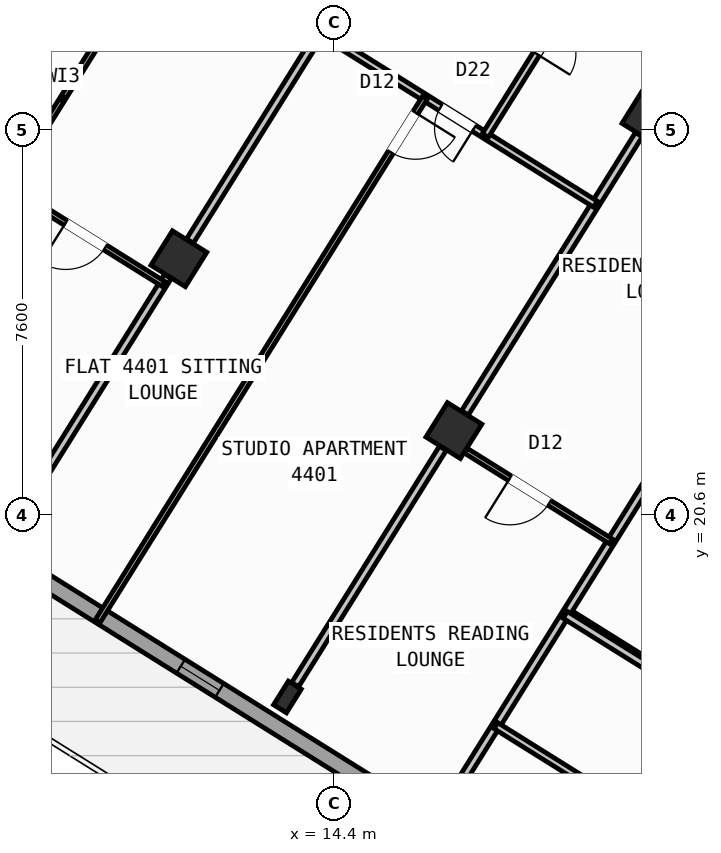
"""IFC4 building model, lengths in metres.
Left out: names, types, materials, properties, quantities, classifications, styles, units other than length and angle.
Written with IfcOpenShell. Run it as: python <this file> out.ifc"""

import sys

from ifc_helpers import new_model, si_unit, direction, frame, frame_2d, origin, origin_2d, place, context, subcontext, project, spatial, rectangle, hollow_rectangle, i_section, extrude, source, transform, mapped, element, fill, save


model = new_model("IFC4")
c1 = context("Model", 3, precision=1e-05, world=origin(), true_north=direction((0.0, 1.0)))
c2 = subcontext(c1, "Body", "Model", "MODEL_VIEW")
j1 = project(units=[si_unit("LENGTHUNIT", "METRE"), si_unit("PLANEANGLEUNIT", "RADIAN")], contexts=[c1])
p1 = place(None, origin())
s1 = spatial("IfcSite", under=j1, at=p1, CompositionType="ELEMENT")
p2 = place(p1, origin())
s2 = spatial("IfcBuilding", under=s1, at=p2, CompositionType="ELEMENT")
p3 = place(p2, frame((0.0, 0.0, 174.9)))
s3 = spatial("IfcBuildingStorey", under=s2, at=p3, CompositionType="ELEMENT", Elevation=174.9)
m1 = source(origin(), c2, "Body", "SweptSolid", [
    extrude(hollow_rectangle(XDim=0.8, YDim=0.8, WallThickness=0.032, at=origin_2d()), origin(), (0.0, 0.0, 1.0), 4.5),
])
for number, where, z_axis, x_axis in (
    (1, (20.632, 28.452, 0.0), (0.0, 0.0, 1.0), (-0.848, 0.53, 0.0)),
    (2, (16.764, 22.261, 0.0), (0.0, 0.0, 1.0), (-0.848, 0.53, 0.0)),
):
    element("IfcColumn", number, at=place(p3, frame(where, z_axis=z_axis, x_axis=x_axis)), inside=s3, PredefinedType="COLUMN", context=c2, shape_type="MappedRepresentation", body=[
        mapped(m1, transform((0.0, 0.0, 0.0), scale=1.0)),
    ])
m2 = source(origin(), c2, "Body", "SweptSolid", [
    extrude(i_section(OverallWidth=0.3, OverallDepth=0.55, WebThickness=0.015, FlangeThickness=0.029, at=origin_2d()), origin(), (0.0, 0.0, 1.0), 4.5),
])
p4 = place(p3, frame((13.478, 17.003, 0.0), z_axis=(0.0, 0.0, 1.0), x_axis=(-0.848048096156, 0.529919264233, 0.0)))
e3 = element("IfcColumn", 3, at=p4, inside=s3, PredefinedType="COLUMN", context=c2, shape_type="MappedRepresentation", body=[
    mapped(m2, transform((0.0, 0.0, 0.0), scale=1.0)),
])
p5 = place(p3, frame((11.336, 25.653, 0.0), z_axis=(0.0, 0.0, 1.0), x_axis=(-0.848048096156, 0.529919264233, 0.0)))
e4 = element("IfcColumn", 4, at=p5, inside=s3, PredefinedType="COLUMN", context=c2, shape_type="MappedRepresentation", body=[
    mapped(m1, transform((0.0, 0.0, 0.0), scale=1.0)),
])
p6 = place(p3, frame((29.268, 6.429, 0.0), z_axis=(0.0, 0.0, 1.0), x_axis=(-0.848049971435, 0.529916263149, 0.0)))
e5 = element("IfcWall", 5, at=p6, inside=s3, PredefinedType="STANDARD", context=c2, shape_type="SweptSolid", body=[
    extrude(rectangle(XDim=31.588, YDim=0.32, at=frame_2d((15.794, 0.0))), origin(), (0.0, 0.0, 1.0), 4.22),
])
p7 = place(p6, frame((27.641, 0.0, 0.0)))
e6 = element("IfcOpeningElement", 6, at=p7, cuts=e5, PredefinedType="OPENING", context=c2, shape_type="SweptSolid", body=[
    extrude(rectangle(XDim=1.2, YDim=2.15, at=frame_2d((0.6, 1.075))), frame((0.0, 0.17, 0.0), z_axis=(0.0, -1.0, 0.0), x_axis=(1.0, 0.0, 0.0)), (0.0, 0.0, 1.0), 0.34),
])
p8 = place(p6, frame((2.954, 0.0, 0.8)))
e7 = element("IfcOpeningElement", 7, at=p8, cuts=e5, PredefinedType="OPENING", context=c2, shape_type="SweptSolid", body=[
    extrude(rectangle(XDim=2.1, YDim=1.55, at=frame_2d((1.05, 0.775))), frame((0.0, 0.17, 0.0), z_axis=(0.0, -1.0, 0.0), x_axis=(1.0, 0.0, 0.0)), (0.0, 0.0, 1.0), 0.34),
])
p9 = place(p6, frame((8.253, 0.0, 0.8)))
e8 = element("IfcOpeningElement", 8, at=p9, cuts=e5, PredefinedType="OPENING", context=c2, shape_type="SweptSolid", body=[
    extrude(rectangle(XDim=2.1, YDim=1.55, at=frame_2d((1.05, 0.775))), frame((0.0, 0.17, 0.0), z_axis=(0.0, -1.0, 0.0), x_axis=(1.0, 0.0, 0.0)), (0.0, 0.0, 1.0), 0.34),
])
p10 = place(p6, frame((20.2, 0.0, 1.0)))
e9 = element("IfcOpeningElement", 9, at=p10, cuts=e5, PredefinedType="OPENING", context=c2, shape_type="SweptSolid", body=[
    extrude(rectangle(XDim=0.9, YDim=1.25, at=frame_2d((0.45, 0.625))), frame((0.0, 0.17, 0.0), z_axis=(0.0, -1.0, 0.0), x_axis=(1.0, 0.0, 0.0)), (0.0, 0.0, 1.0), 0.34),
])
p11 = place(p3, frame((2.415, 23.452, 0.0), z_axis=(0.0, 0.0, 1.0), x_axis=(0.52991049553, 0.848053575387, 0.0)))
e10 = element("IfcWall", 10, at=p11, inside=s3, PredefinedType="STANDARD", context=c2, shape_type="SweptSolid", body=[
    extrude(rectangle(XDim=21.587, YDim=0.32, at=frame_2d((10.794, 0.0))), origin(), (0.0, 0.0, 1.0), 2.395),
])
p12 = place(p11, frame((3.469, 0.0, 1.0)))
e11 = element("IfcOpeningElement", 11, at=p12, cuts=e10, PredefinedType="OPENING", context=c2, shape_type="SweptSolid", body=[
    extrude(rectangle(XDim=0.9, YDim=1.25, at=frame_2d((0.45, 0.625))), frame((0.0, 0.17, 0.0), z_axis=(0.0, -1.0, 0.0), x_axis=(1.0, 0.0, 0.0)), (0.0, 0.0, 1.0), 0.34),
])
p13 = place(p11, frame((8.344, 0.0, 1.0)))
e12 = element("IfcOpeningElement", 12, at=p13, cuts=e10, PredefinedType="OPENING", context=c2, shape_type="SweptSolid", body=[
    extrude(rectangle(XDim=0.9, YDim=1.25, at=frame_2d((0.45, 0.625))), frame((0.0, 0.17, 0.0), z_axis=(0.0, -1.0, 0.0), x_axis=(1.0, 0.0, 0.0)), (0.0, 0.0, 1.0), 0.34),
])
p14 = place(p11, frame((11.244, 0.0, 1.0)))
e13 = element("IfcOpeningElement", 13, at=p14, cuts=e10, PredefinedType="OPENING", context=c2, shape_type="SweptSolid", body=[
    extrude(rectangle(XDim=0.9, YDim=1.25, at=frame_2d((0.45, 0.625))), frame((0.0, 0.17, 0.0), z_axis=(0.0, -1.0, 0.0), x_axis=(1.0, 0.0, 0.0)), (0.0, 0.0, 1.0), 0.34),
])
p15 = place(p11, frame((14.829, 0.0, 1.0)))
e14 = element("IfcOpeningElement", 14, at=p15, cuts=e10, PredefinedType="OPENING", context=c2, shape_type="SweptSolid", body=[
    extrude(rectangle(XDim=0.9, YDim=1.25, at=frame_2d((0.45, 0.625))), frame((0.0, 0.17, 0.0), z_axis=(0.0, -1.0, 0.0), x_axis=(1.0, 0.0, 0.0)), (0.0, 0.0, 1.0), 0.34),
])
p16 = place(p3, frame((14.138, 41.825, 0.0), z_axis=(0.0, 0.0, 1.0), x_axis=(0.848046498049, -0.529921821731, 0.0)))
e15 = element("IfcWall", 15, at=p16, inside=s3, PredefinedType="STANDARD", context=c2, shape_type="SweptSolid", body=[
    extrude(rectangle(XDim=31.588, YDim=0.32, at=frame_2d((15.794, 0.0))), origin(), (0.0, 0.0, 1.0), 4.22),
])
p17 = place(p16, frame((3.339, 0.0, 0.0)))
e16 = element("IfcOpeningElement", 16, at=p17, cuts=e15, PredefinedType="OPENING", context=c2, shape_type="SweptSolid", body=[
    extrude(rectangle(XDim=1.05, YDim=2.15, at=frame_2d((0.525, 1.075))), frame((0.0, 0.17, 0.0), z_axis=(0.0, -1.0, 0.0), x_axis=(1.0, 0.0, 0.0)), (0.0, 0.0, 1.0), 0.34),
])
p18 = place(p16, frame((1.819, 0.0, 1.0)))
e17 = element("IfcOpeningElement", 17, at=p18, cuts=e15, PredefinedType="OPENING", context=c2, shape_type="SweptSolid", body=[
    extrude(rectangle(XDim=0.9, YDim=1.25, at=frame_2d((0.45, 0.625))), frame((0.0, 0.17, 0.0), z_axis=(0.0, -1.0, 0.0), x_axis=(1.0, 0.0, 0.0)), (0.0, 0.0, 1.0), 0.34),
])
p19 = place(p16, frame((8.494, 0.0, 0.85)))
e18 = element("IfcOpeningElement", 18, at=p19, cuts=e15, PredefinedType="OPENING", context=c2, shape_type="SweptSolid", body=[
    extrude(rectangle(XDim=1.8, YDim=1.5, at=frame_2d((0.9, 0.75))), frame((0.0, 0.17, 0.0), z_axis=(0.0, -1.0, 0.0), x_axis=(1.0, 0.0, 0.0)), (0.0, 0.0, 1.0), 0.34),
])
p20 = place(p16, frame((14.636, 0.0, 1.0)))
e19 = element("IfcOpeningElement", 19, at=p20, cuts=e15, PredefinedType="OPENING", context=c2, shape_type="SweptSolid", body=[
    extrude(rectangle(XDim=0.9, YDim=1.25, at=frame_2d((0.45, 0.625))), frame((0.0, 0.17, 0.0), z_axis=(0.0, -1.0, 0.0), x_axis=(1.0, 0.0, 0.0)), (0.0, 0.0, 1.0), 0.34),
])
p21 = place(p16, frame((22.456, 0.0, 0.95)))
e20 = element("IfcOpeningElement", 20, at=p21, cuts=e15, PredefinedType="OPENING", context=c2, shape_type="SweptSolid", body=[
    extrude(rectangle(XDim=1.2, YDim=1.4, at=frame_2d((0.6, 0.7))), frame((0.0, 0.17, 0.0), z_axis=(0.0, -1.0, 0.0), x_axis=(1.0, 0.0, 0.0)), (0.0, 0.0, 1.0), 0.34),
])
p22 = place(p16, frame((27.131, 0.0, 0.95)))
e21 = element("IfcOpeningElement", 21, at=p22, cuts=e15, PredefinedType="OPENING", context=c2, shape_type="SweptSolid", body=[
    extrude(rectangle(XDim=1.2, YDim=1.4, at=frame_2d((0.6, 0.7))), frame((0.0, 0.17, 0.0), z_axis=(0.0, -1.0, 0.0), x_axis=(1.0, 0.0, 0.0)), (0.0, 0.0, 1.0), 0.34),
])
p23 = place(p3, frame((21.206, 17.292, 0.0), z_axis=(0.0, 0.0, 1.0), x_axis=(-0.848050851465, 0.529914854792, 0.0)))
e22 = element("IfcWall", 22, at=p23, inside=s3, PredefinedType="PARTITIONING", context=c2, shape_type="SweptSolid", body=[
    extrude(rectangle(XDim=2.61, YDim=0.16, at=frame_2d((1.305, 0.0))), origin(), (0.0, 0.0, 1.0), 4.21),
])
p24 = place(p3, frame((25.198, 28.606, 0.0), z_axis=(0.0, 0.0, 1.0), x_axis=(-0.529921796515, -0.848046513806, 0.0)))
e23 = element("IfcWall", 23, at=p24, inside=s3, PredefinedType="PARTITIONING", context=c2, shape_type="SweptSolid", body=[
    extrude(rectangle(XDim=16.5, YDim=0.16, at=frame_2d((8.25, 0.0))), origin(), (0.0, 0.0, 1.0), 4.21),
])
p25 = place(p3, frame((25.198, 28.606, 0.0), z_axis=(0.0, 0.0, 1.0), x_axis=(-0.848052408131, 0.529912363569, 0.0)))
e24 = element("IfcWall", 24, at=p25, inside=s3, PredefinedType="PARTITIONING", context=c2, shape_type="SweptSolid", body=[
    extrude(rectangle(XDim=16.73, YDim=0.16, at=frame_2d((8.365, 0.0))), origin(), (0.0, 0.0, 1.0), 4.21),
])
p26 = place(p25, frame((1.395, 0.0, 0.0)))
e25 = element("IfcOpeningElement", 25, at=p26, cuts=e24, PredefinedType="OPENING", context=c2, shape_type="SweptSolid", body=[
    extrude(rectangle(XDim=1.0, YDim=2.1, at=frame_2d((0.5, 1.05))), frame((0.0, 0.09, 0.0), z_axis=(0.0, -1.0, 0.0), x_axis=(1.0, 0.0, 0.0)), (0.0, 0.0, 1.0), 0.18),
])
p27 = place(p25, frame((7.82, 0.0, 0.0)))
e26 = element("IfcOpeningElement", 26, at=p27, cuts=e24, PredefinedType="OPENING", context=c2, shape_type="SweptSolid", body=[
    extrude(rectangle(XDim=1.0, YDim=2.1, at=frame_2d((0.5, 1.05))), frame((0.0, 0.09, 0.0), z_axis=(0.0, -1.0, 0.0), x_axis=(1.0, 0.0, 0.0)), (0.0, 0.0, 1.0), 0.18),
])
p28 = place(p25, frame((14.76, 0.0, 0.0)))
e27 = element("IfcOpeningElement", 27, at=p28, cuts=e24, PredefinedType="OPENING", context=c2, shape_type="SweptSolid", body=[
    extrude(rectangle(XDim=1.0, YDim=2.1, at=frame_2d((0.5, 1.05))), frame((0.0, 0.09, 0.0), z_axis=(0.0, -1.0, 0.0), x_axis=(1.0, 0.0, 0.0)), (0.0, 0.0, 1.0), 0.18),
])
p29 = place(p3, frame((20.414, 28.103, 0.0), z_axis=(0.0, 0.0, 1.0), x_axis=(-0.529934553702, -0.848038542045, 0.0)))
e28 = element("IfcWall", 28, at=p29, inside=s3, PredefinedType="PARTITIONING", context=c2, shape_type="SweptSolid", body=[
    extrude(rectangle(XDim=6.476, YDim=0.16, at=frame_2d((3.238, 0.0))), origin(), (0.0, 0.0, 1.0), 2.395),
])
p30 = place(p3, frame((16.545, 21.912, 0.0), z_axis=(0.0, 0.0, 1.0), x_axis=(-0.52995106774, -0.848028222291, 0.0)))
e29 = element("IfcWall", 29, at=p30, inside=s3, PredefinedType="PARTITIONING", context=c2, shape_type="SweptSolid", body=[
    extrude(rectangle(XDim=5.501, YDim=0.16, at=frame_2d((2.75, 0.0))), origin(), (0.0, 0.0, 1.0), 4.21),
])
p31 = place(p3, frame((19.865, 20.073, 0.0), z_axis=(0.0, 0.0, 1.0), x_axis=(-0.848055143312, 0.529907986259, 0.0)))
e30 = element("IfcWall", 30, at=p31, inside=s3, PredefinedType="PARTITIONING", context=c2, shape_type="SweptSolid", body=[
    extrude(rectangle(XDim=3.378, YDim=0.11, at=frame_2d((1.689, 0.0))), origin(), (0.0, 0.0, 1.0), 2.395),
])
p32 = place(p31, frame((1.435, 0.0, 0.0)))
e31 = element("IfcOpeningElement", 31, at=p32, cuts=e30, PredefinedType="OPENING", context=c2, shape_type="SweptSolid", body=[
    extrude(rectangle(XDim=0.92, YDim=2.08, at=frame_2d((0.46, 1.04))), frame((0.0, 0.065, 0.0), z_axis=(0.0, -1.0, 0.0), x_axis=(1.0, 0.0, 0.0)), (0.0, 0.0, 1.0), 0.13),
])
p33 = place(p3, frame((14.986, 31.494, 0.0), z_axis=(0.0, 0.0, 1.0), x_axis=(-0.529907440938, -0.848055484057, 0.0)))
e32 = element("IfcWall", 32, at=p33, inside=s3, PredefinedType="PARTITIONING", context=c2, shape_type="SweptSolid", body=[
    extrude(rectangle(XDim=6.476, YDim=0.16, at=frame_2d((3.238, 0.0))), origin(), (0.0, 0.0, 1.0), 2.395),
])
p34 = place(p3, frame((11.118, 25.303, 0.0), z_axis=(0.0, 0.0, 1.0), x_axis=(-0.529919150083, -0.848048167486, 0.0)))
e33 = element("IfcWall", 33, at=p34, inside=s3, PredefinedType="PARTITIONING", context=c2, shape_type="SweptSolid", body=[
    extrude(rectangle(XDim=5.501, YDim=0.16, at=frame_2d((2.75, 0.0))), origin(), (0.0, 0.0, 1.0), 4.21),
])
p35 = place(p3, frame((19.556, 26.73, 0.0), z_axis=(0.0, 0.0, 1.0), x_axis=(-0.848049732085, 0.529916646191, 0.0)))
e34 = element("IfcWall", 34, at=p35, inside=s3, PredefinedType="PLUMBINGWALL", context=c2, shape_type="SweptSolid", body=[
    extrude(rectangle(XDim=6.4, YDim=0.14, at=frame_2d((3.2, 0.0))), origin(), (0.0, 0.0, 1.0), 4.21),
])
p36 = place(p35, frame((2.824, 0.0, 0.0)))
e35 = element("IfcOpeningElement", 35, at=p36, cuts=e34, PredefinedType="OPENING", context=c2, shape_type="SweptSolid", body=[
    extrude(rectangle(XDim=0.78, YDim=2.05, at=frame_2d((0.39, 1.025))), frame((0.0, 0.08, 0.0), z_axis=(0.0, -1.0, 0.0), x_axis=(1.0, 0.0, 0.0)), (0.0, 0.0, 1.0), 0.16),
])
p37 = place(p3, frame((19.812, 31.971, 0.0), z_axis=(0.0, 0.0, 1.0), x_axis=(-0.529917480809, -0.848049210561, 0.0)))
e36 = element("IfcWall", 36, at=p37, inside=s3, PredefinedType="PLUMBINGWALL", context=c2, shape_type="SweptSolid", body=[
    extrude(rectangle(XDim=4.58, YDim=0.14, at=frame_2d((2.29, 0.0))), origin(), (0.0, 0.0, 1.0), 4.21),
])
p38 = place(p37, frame((1.9, 0.0, 0.0)))
e37 = element("IfcOpeningElement", 37, at=p38, cuts=e36, PredefinedType="OPENING", context=c2, shape_type="SweptSolid", body=[
    extrude(rectangle(XDim=0.78, YDim=2.05, at=frame_2d((0.39, 1.025))), frame((0.0, 0.08, 0.0), z_axis=(0.0, -1.0, 0.0), x_axis=(1.0, 0.0, 0.0)), (0.0, 0.0, 1.0), 0.16),
])
p39 = place(p3, frame((16.191, 28.833, 0.0), z_axis=(0.0, 0.0, 1.0), x_axis=(-0.529921526101, -0.84804668278, 0.0)))
e38 = element("IfcWall", 38, at=p39, inside=s3, PredefinedType="PARTITIONING", context=c2, shape_type="SweptSolid", body=[
    extrude(rectangle(XDim=12.19, YDim=0.11, at=frame_2d((6.095, 0.0))), origin(), (0.0, 0.0, 1.0), 4.21),
])
p40 = place(p39, frame((0.35, 0.0, 0.0)))
e39 = element("IfcOpeningElement", 39, at=p40, cuts=e38, PredefinedType="OPENING", context=c2, shape_type="SweptSolid", body=[
    extrude(rectangle(XDim=0.92, YDim=2.08, at=frame_2d((0.46, 1.04))), frame((0.0, 0.065, 0.0), z_axis=(0.0, -1.0, 0.0), x_axis=(1.0, 0.0, 0.0)), (0.0, 0.0, 1.0), 0.13),
])
p41 = place(p3, frame((13.486, 35.924, 0.0), z_axis=(0.0, 0.0, 1.0), x_axis=(-0.529920421309, -0.848047373134, 0.0)))
e40 = element("IfcWall", 40, at=p41, inside=s3, PredefinedType="PARTITIONING", context=c2, shape_type="SweptSolid", body=[
    extrude(rectangle(XDim=16.77, YDim=0.11, at=frame_2d((8.385, 0.0))), origin(), (0.0, 0.0, 1.0), 4.21),
])
p42 = place(p41, frame((0.76, 0.0, 0.0)))
e41 = element("IfcOpeningElement", 41, at=p42, cuts=e40, PredefinedType="OPENING", context=c2, shape_type="SweptSolid", body=[
    extrude(rectangle(XDim=0.78, YDim=2.05, at=frame_2d((0.39, 1.025))), frame((0.0, 0.065, 0.0), z_axis=(0.0, -1.0, 0.0), x_axis=(1.0, 0.0, 0.0)), (0.0, 0.0, 1.0), 0.13),
])
p43 = place(p41, frame((5.967, 0.0, 0.0)))
e42 = element("IfcOpeningElement", 42, at=p43, cuts=e40, PredefinedType="OPENING", context=c2, shape_type="SweptSolid", body=[
    extrude(rectangle(XDim=0.92, YDim=2.08, at=frame_2d((0.46, 1.04))), frame((0.0, 0.065, 0.0), z_axis=(0.0, -1.0, 0.0), x_axis=(1.0, 0.0, 0.0)), (0.0, 0.0, 1.0), 0.13),
])
p44 = place(p3, frame((11.027, 25.158, 0.0), z_axis=(0.0, 0.0, 1.0), x_axis=(-0.848051346257, 0.52991406295, 0.0)))
e43 = element("IfcWall", 43, at=p44, inside=s3, PredefinedType="PARTITIONING", context=c2, shape_type="SweptSolid", body=[
    extrude(rectangle(XDim=3.62, YDim=0.11, at=frame_2d((1.81, 0.0))), origin(), (0.0, 0.0, 1.0), 4.21),
])
p45 = place(p44, frame((1.35, 0.0, 0.0)))
e44 = element("IfcOpeningElement", 44, at=p45, cuts=e43, PredefinedType="OPENING", context=c2, shape_type="SweptSolid", body=[
    extrude(rectangle(XDim=0.92, YDim=2.08, at=frame_2d((0.46, 1.04))), frame((0.0, 0.065, 0.0), z_axis=(0.0, -1.0, 0.0), x_axis=(1.0, 0.0, 0.0)), (0.0, 0.0, 1.0), 0.13),
])
p46 = place(p3, frame((32.164, 10.374, 0.0), z_axis=(0.0, 0.0, 1.0), x_axis=(-0.848044107957, 0.529925646633, 0.0)))
e45 = element("IfcWall", 45, at=p46, inside=s3, PredefinedType="PARTITIONING", context=c2, shape_type="SweptSolid", body=[
    extrude(rectangle(XDim=15.57, YDim=0.16, at=frame_2d((7.785, 0.0))), origin(), (0.0, 0.0, 1.0), 4.21),
])
p47 = place(p46, frame((10.83, 0.0, 0.0)))
e46 = element("IfcOpeningElement", 46, at=p47, cuts=e45, PredefinedType="OPENING", context=c2, shape_type="SweptSolid", body=[
    extrude(rectangle(XDim=1.0, YDim=2.1, at=frame_2d((0.5, 1.05))), frame((0.0, 0.09, 0.0), z_axis=(0.0, -1.0, 0.0), x_axis=(1.0, 0.0, 0.0)), (0.0, 0.0, 1.0), 0.18),
])
p48 = place(p3, frame((29.72, 8.859, 0.0), z_axis=(0.0, 0.0, 1.0), x_axis=(-0.848049134363, 0.529917602752, 0.0)))
e47 = element("IfcWall", 47, at=p48, inside=s3, PredefinedType="PLUMBINGWALL", context=c2, shape_type="SweptSolid", body=[
    extrude(rectangle(XDim=14.3, YDim=0.14, at=frame_2d((7.15, 0.0))), origin(), (0.0, 0.0, 1.0), 4.21),
])
p49 = place(p48, frame((9.57, 0.0, 0.0)))
e48 = element("IfcOpeningElement", 48, at=p49, cuts=e47, PredefinedType="OPENING", context=c2, shape_type="SweptSolid", body=[
    extrude(rectangle(XDim=0.92, YDim=2.08, at=frame_2d((0.46, 1.04))), frame((0.0, 0.08, 0.0), z_axis=(0.0, -1.0, 0.0), x_axis=(1.0, 0.0, 0.0)), (0.0, 0.0, 1.0), 0.16),
])
m3 = source(origin(), c2, "Body", "SweptSolid", [
    extrude(rectangle(XDim=0.9, YDim=1.25, at=frame_2d((0.45, 0.625))), frame((0.0, 0.03, 0.0), z_axis=(0.0, -1.0, 0.0), x_axis=(1.0, 0.0, 0.0)), (0.0, 0.0, 1.0), 0.06),
])
p50 = place(p10, origin())
e49 = element("IfcWindow", 49, at=p50, inside=s3, PartitioningType="SINGLE_PANEL", PredefinedType="WINDOW", context=c2, shape_type="MappedRepresentation", body=[
    mapped(m3, transform((0.0, 0.0, 0.0), scale=1.0)),
])
fill(e9, e49)
m4 = source(origin(), c2, "Body", "SweptSolid", [
    extrude(rectangle(XDim=0.92, YDim=2.08, at=frame_2d((0.46, 1.04))), frame((0.0, 0.025, 0.0), z_axis=(0.0, -1.0, 0.0), x_axis=(1.0, 0.0, 0.0)), (0.0, 0.0, 1.0), 0.05),
])
p51 = place(p32, origin())
e50 = element("IfcDoor", 50, at=p51, inside=s3, OperationType="SINGLE_SWING_RIGHT", PredefinedType="DOOR", context=c2, shape_type="MappedRepresentation", body=[
    mapped(m4, transform((0.0, 0.0, 0.0), scale=1.0)),
])
fill(e31, e50)
p52 = place(p40, origin())
e51 = element("IfcDoor", 51, at=p52, inside=s3, OperationType="SINGLE_SWING_LEFT", PredefinedType="DOOR", context=c2, shape_type="MappedRepresentation", body=[
    mapped(m4, transform((0.0, 0.0, 0.0), scale=1.0)),
])
fill(e39, e51)
m5 = source(origin(), c2, "Body", "SweptSolid", [
    extrude(rectangle(XDim=0.78, YDim=2.05, at=frame_2d((0.39, 1.025))), frame((0.0, 0.025, 0.0), z_axis=(0.0, -1.0, 0.0), x_axis=(1.0, 0.0, 0.0)), (0.0, 0.0, 1.0), 0.05),
])
p53 = place(p36, origin())
e52 = element("IfcDoor", 52, at=p53, inside=s3, OperationType="SINGLE_SWING_LEFT", PredefinedType="DOOR", context=c2, shape_type="MappedRepresentation", body=[
    mapped(m5, transform((0.0, 0.0, 0.0), scale=1.0)),
])
fill(e35, e52)
p54 = place(p38, origin())
e53 = element("IfcDoor", 53, at=p54, inside=s3, OperationType="SINGLE_SWING_RIGHT", PredefinedType="DOOR", context=c2, shape_type="MappedRepresentation", body=[
    mapped(m5, transform((0.0, 0.0, 0.0), scale=1.0)),
])
fill(e37, e53)
p55 = place(p45, origin())
e54 = element("IfcDoor", 54, at=p55, inside=s3, OperationType="SINGLE_SWING_RIGHT", PredefinedType="DOOR", context=c2, shape_type="MappedRepresentation", body=[
    mapped(m4, transform((0.0, 0.0, 0.0), scale=1.0)),
])
fill(e44, e54)
save(model, sys.argv[1])
